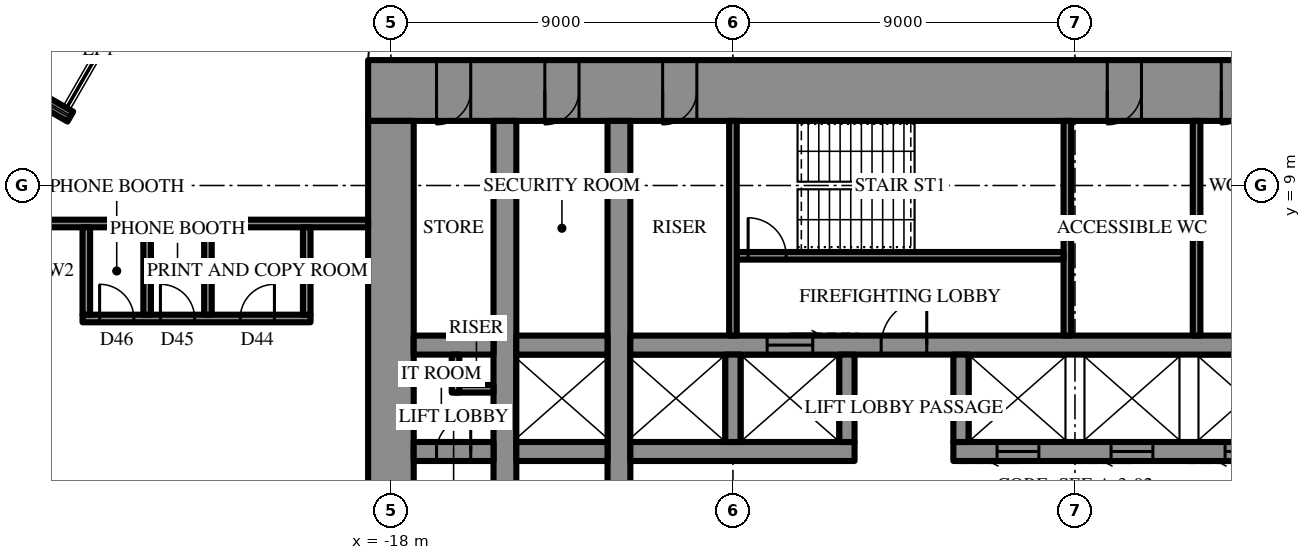
"""IFC4 building model, lengths in metres.
Left out: names, types, materials, properties, quantities, classifications, styles, units other than length and angle.
Written with IfcOpenShell. Run it as: python <this file> out.ifc"""

import sys

from ifc_helpers import new_model, si_unit, direction, frame, frame_2d, origin, place, context, subcontext, project, spatial, rectangle, extrude, element, fill, save


model = new_model("IFC4")
c1 = context("Model", 3, precision=1e-05, world=origin(), true_north=direction((0.0, 1.0)))
c2 = subcontext(c1, "Body", "Model", "MODEL_VIEW")
j1 = project(units=[si_unit("LENGTHUNIT", "METRE"), si_unit("PLANEANGLEUNIT", "RADIAN")], contexts=[c1])
p1 = place(None, origin())
s1 = spatial("IfcSite", under=j1, at=p1, CompositionType="ELEMENT")
p2 = place(p1, origin())
s2 = spatial("IfcBuilding", under=s1, at=p2, CompositionType="ELEMENT")
p3 = place(p2, frame((0.0, 0.0, 123.7)))
s3 = spatial("IfcBuildingStorey", under=s2, at=p3, CompositionType="ELEMENT", Elevation=123.7)
p4 = place(p3, frame((-18.6, 11.5, 0.0), z_axis=(0.0, 0.0, 1.0), x_axis=(1.0, 0.0, 0.0)))
e1 = element("IfcWall", 1, at=p4, inside=s3, PredefinedType="SHEAR", context=c2, shape_type="SweptSolid", body=[
    extrude(rectangle(XDim=37.2, YDim=1.6, at=frame_2d((18.6, 0.0))), origin(), (0.0, 0.0, 1.0), 4.2),
])
p5 = place(p4, frame((19.45, 0.0, 0.0)))
e2 = element("IfcOpeningElement", 2, at=p5, cuts=e1, PredefinedType="OPENING", context=c2, shape_type="SweptSolid", body=[
    extrude(rectangle(XDim=0.9, YDim=2.2, at=frame_2d((0.45, 1.1))), frame((0.0, 0.81, 0.0), z_axis=(0.0, -1.0, 0.0), x_axis=(1.0, 0.0, 0.0)), (0.0, 0.0, 1.0), 1.62),
])
p6 = place(p4, frame((22.45, 0.0, 0.0)))
e3 = element("IfcOpeningElement", 3, at=p6, cuts=e1, PredefinedType="OPENING", context=c2, shape_type="SweptSolid", body=[
    extrude(rectangle(XDim=0.9, YDim=2.2, at=frame_2d((0.45, 1.1))), frame((0.0, 0.81, 0.0), z_axis=(0.0, -1.0, 0.0), x_axis=(1.0, 0.0, 0.0)), (0.0, 0.0, 1.0), 1.62),
])
p7 = place(p4, frame((25.5, 0.0, 0.0)))
e4 = element("IfcOpeningElement", 4, at=p7, cuts=e1, PredefinedType="OPENING", context=c2, shape_type="SweptSolid", body=[
    extrude(rectangle(XDim=1.0, YDim=2.2, at=frame_2d((0.5, 1.1))), frame((0.0, 0.81, 0.0), z_axis=(0.0, -1.0, 0.0), x_axis=(1.0, 0.0, 0.0)), (0.0, 0.0, 1.0), 1.62),
])
p8 = place(p4, frame((1.8, 0.0, 0.0)))
e5 = element("IfcOpeningElement", 5, at=p8, cuts=e1, PredefinedType="OPENING", context=c2, shape_type="SweptSolid", body=[
    extrude(rectangle(XDim=0.9, YDim=2.2, at=frame_2d((0.45, 1.1))), frame((0.0, 0.81, 0.0), z_axis=(0.0, -1.0, 0.0), x_axis=(1.0, 0.0, 0.0)), (0.0, 0.0, 1.0), 1.62),
])
p9 = place(p4, frame((4.65, 0.0, 0.0)))
e6 = element("IfcOpeningElement", 6, at=p9, cuts=e1, PredefinedType="OPENING", context=c2, shape_type="SweptSolid", body=[
    extrude(rectangle(XDim=0.9, YDim=2.2, at=frame_2d((0.45, 1.1))), frame((0.0, 0.81, 0.0), z_axis=(0.0, -1.0, 0.0), x_axis=(1.0, 0.0, 0.0)), (0.0, 0.0, 1.0), 1.62),
])
p10 = place(p4, frame((7.75, 0.0, 0.0)))
e7 = element("IfcOpeningElement", 7, at=p10, cuts=e1, PredefinedType="OPENING", context=c2, shape_type="SweptSolid", body=[
    extrude(rectangle(XDim=0.9, YDim=2.2, at=frame_2d((0.45, 1.1))), frame((0.0, 0.81, 0.0), z_axis=(0.0, -1.0, 0.0), x_axis=(1.0, 0.0, 0.0)), (0.0, 0.0, 1.0), 1.62),
])
p11 = place(p4, frame((28.55, 0.0, 0.0)))
e8 = element("IfcOpeningElement", 8, at=p11, cuts=e1, PredefinedType="OPENING", context=c2, shape_type="SweptSolid", body=[
    extrude(rectangle(XDim=0.9, YDim=2.2, at=frame_2d((0.45, 1.1))), frame((0.0, 0.81, 0.0), z_axis=(0.0, -1.0, 0.0), x_axis=(1.0, 0.0, 0.0)), (0.0, 0.0, 1.0), 1.62),
])
p12 = place(p4, frame((31.65, 0.0, 0.0)))
e9 = element("IfcOpeningElement", 9, at=p12, cuts=e1, PredefinedType="OPENING", context=c2, shape_type="SweptSolid", body=[
    extrude(rectangle(XDim=0.9, YDim=2.2, at=frame_2d((0.45, 1.1))), frame((0.0, 0.81, 0.0), z_axis=(0.0, -1.0, 0.0), x_axis=(1.0, 0.0, 0.0)), (0.0, 0.0, 1.0), 1.62),
])
p13 = place(p4, frame((34.5, 0.0, 0.0)))
e10 = element("IfcOpeningElement", 10, at=p13, cuts=e1, PredefinedType="OPENING", context=c2, shape_type="SweptSolid", body=[
    extrude(rectangle(XDim=0.9, YDim=2.2, at=frame_2d((0.45, 1.1))), frame((0.0, 0.81, 0.0), z_axis=(0.0, -1.0, 0.0), x_axis=(1.0, 0.0, 0.0)), (0.0, 0.0, 1.0), 1.62),
])
p14 = place(p3, frame((-18.0, 10.7, 0.0), z_axis=(0.0, 0.0, 1.0), x_axis=(0.0, -1.0, 0.0)))
e11 = element("IfcWall", 11, at=p14, inside=s3, PredefinedType="SHEAR", context=c2, shape_type="SweptSolid", body=[
    extrude(rectangle(XDim=21.4, YDim=1.2, at=frame_2d((10.7, 0.0))), origin(), (0.0, 0.0, 1.0), 4.2),
])
p15 = place(p14, frame((9.8, 0.0, 0.0)))
e12 = element("IfcOpeningElement", 12, at=p15, cuts=e11, PredefinedType="OPENING", context=c2, shape_type="SweptSolid", body=[
    extrude(rectangle(XDim=1.8, YDim=2.4, at=frame_2d((0.9, 1.2))), frame((0.0, 0.61, 0.0), z_axis=(0.0, -1.0, 0.0), x_axis=(1.0, 0.0, 0.0)), (0.0, 0.0, 1.0), 1.22),
])
p16 = place(p3, frame((-12.0, -10.7, 0.0), z_axis=(0.0, 0.0, 1.0), x_axis=(0.0, 1.0, 0.0)))
e13 = element("IfcWall", 13, at=p16, inside=s3, PredefinedType="SHEAR", context=c2, shape_type="SweptSolid", body=[
    extrude(rectangle(XDim=21.4, YDim=0.6, at=frame_2d((10.7, 0.0))), origin(), (0.0, 0.0, 1.0), 4.2),
])
p17 = place(p16, frame((9.8, 0.0, 0.0)))
e14 = element("IfcOpeningElement", 14, at=p17, cuts=e13, PredefinedType="OPENING", context=c2, shape_type="SweptSolid", body=[
    extrude(rectangle(XDim=1.8, YDim=2.4, at=frame_2d((0.9, 1.2))), frame((0.0, 0.31, 0.0), z_axis=(0.0, -1.0, 0.0), x_axis=(1.0, 0.0, 0.0)), (0.0, 0.0, 1.0), 0.62),
])
p18 = place(p3, frame((-15.0, -10.7, 0.0), z_axis=(0.0, 0.0, 1.0), x_axis=(0.0, 1.0, 0.0)))
e15 = element("IfcWall", 15, at=p18, inside=s3, PredefinedType="SHEAR", context=c2, shape_type="SweptSolid", body=[
    extrude(rectangle(XDim=21.4, YDim=0.6, at=frame_2d((10.7, 0.0))), origin(), (0.0, 0.0, 1.0), 4.2),
])
p19 = place(p18, frame((9.8, 0.0, 0.0)))
e16 = element("IfcOpeningElement", 16, at=p19, cuts=e15, PredefinedType="OPENING", context=c2, shape_type="SweptSolid", body=[
    extrude(rectangle(XDim=1.8, YDim=2.4, at=frame_2d((0.9, 1.2))), frame((0.0, 0.31, 0.0), z_axis=(0.0, -1.0, 0.0), x_axis=(1.0, 0.0, 0.0)), (0.0, 0.0, 1.0), 0.62),
])
p20 = place(p3, frame((-17.4, 2.0, 0.0), z_axis=(0.0, 0.0, 1.0), x_axis=(1.0, 0.0, 0.0)))
e17 = element("IfcWall", 17, at=p20, inside=s3, PredefinedType="SHEAR", context=c2, shape_type="SweptSolid", body=[
    extrude(rectangle(XDim=2.1, YDim=0.5, at=frame_2d((1.05, 0.0))), origin(), (0.0, 0.0, 1.0), 4.2),
])
p21 = place(p20, frame((0.6, 0.0, 0.0)))
e18 = element("IfcOpeningElement", 18, at=p21, cuts=e17, PredefinedType="OPENING", context=c2, shape_type="SweptSolid", body=[
    extrude(rectangle(XDim=0.9, YDim=2.2, at=frame_2d((0.45, 1.1))), frame((0.0, 0.26, 0.0), z_axis=(0.0, -1.0, 0.0), x_axis=(1.0, 0.0, 0.0)), (0.0, 0.0, 1.0), 0.52),
])
p22 = place(p3, frame((-14.7, 2.0, 0.0), z_axis=(0.0, 0.0, 1.0), x_axis=(1.0, 0.0, 0.0)))
e19 = element("IfcWall", 19, at=p22, inside=s3, PredefinedType="SHEAR", context=c2, shape_type="SweptSolid", body=[
    extrude(rectangle(XDim=2.4, YDim=0.5, at=frame_2d((1.2, 0.0))), origin(), (0.0, 0.0, 1.0), 4.2),
])
p23 = place(p3, frame((-11.7, 2.0, 0.0), z_axis=(0.0, 0.0, 1.0), x_axis=(1.0, 0.0, 0.0)))
e20 = element("IfcWall", 20, at=p23, inside=s3, PredefinedType="SHEAR", context=c2, shape_type="SweptSolid", body=[
    extrude(rectangle(XDim=5.9, YDim=0.5, at=frame_2d((2.95, 0.0))), origin(), (0.0, 0.0, 1.0), 4.2),
])
p24 = place(p3, frame((-3.2, 2.0, 0.0), z_axis=(0.0, 0.0, 1.0), x_axis=(1.0, 0.0, 0.0)))
e21 = element("IfcWall", 21, at=p24, inside=s3, PredefinedType="SHEAR", context=c2, shape_type="SweptSolid", body=[
    extrude(rectangle(XDim=14.9, YDim=0.5, at=frame_2d((7.45, 0.0))), origin(), (0.0, 0.0, 1.0), 4.2),
])
p25 = place(p24, frame((1.15, 0.0, 0.0)))
e22 = element("IfcOpeningElement", 22, at=p25, cuts=e21, PredefinedType="OPENING", context=c2, shape_type="SweptSolid", body=[
    extrude(rectangle(XDim=1.1, YDim=2.2, at=frame_2d((0.55, 1.1))), frame((0.0, 0.26, 0.0), z_axis=(0.0, -1.0, 0.0), x_axis=(1.0, 0.0, 0.0)), (0.0, 0.0, 1.0), 0.52),
])
p26 = place(p24, frame((4.15, 0.0, 0.0)))
e23 = element("IfcOpeningElement", 23, at=p26, cuts=e21, PredefinedType="OPENING", context=c2, shape_type="SweptSolid", body=[
    extrude(rectangle(XDim=1.1, YDim=2.2, at=frame_2d((0.55, 1.1))), frame((0.0, 0.26, 0.0), z_axis=(0.0, -1.0, 0.0), x_axis=(1.0, 0.0, 0.0)), (0.0, 0.0, 1.0), 0.52),
])
p27 = place(p24, frame((7.15, 0.0, 0.0)))
e24 = element("IfcOpeningElement", 24, at=p27, cuts=e21, PredefinedType="OPENING", context=c2, shape_type="SweptSolid", body=[
    extrude(rectangle(XDim=1.1, YDim=2.2, at=frame_2d((0.55, 1.1))), frame((0.0, 0.26, 0.0), z_axis=(0.0, -1.0, 0.0), x_axis=(1.0, 0.0, 0.0)), (0.0, 0.0, 1.0), 0.52),
])
p28 = place(p24, frame((10.15, 0.0, 0.0)))
e25 = element("IfcOpeningElement", 25, at=p28, cuts=e21, PredefinedType="OPENING", context=c2, shape_type="SweptSolid", body=[
    extrude(rectangle(XDim=1.1, YDim=2.2, at=frame_2d((0.55, 1.1))), frame((0.0, 0.26, 0.0), z_axis=(0.0, -1.0, 0.0), x_axis=(1.0, 0.0, 0.0)), (0.0, 0.0, 1.0), 0.52),
])
p29 = place(p3, frame((-17.4, 4.8, 0.0), z_axis=(0.0, 0.0, 1.0), x_axis=(1.0, 0.0, 0.0)))
e26 = element("IfcWall", 26, at=p29, inside=s3, PredefinedType="SHEAR", context=c2, shape_type="SweptSolid", body=[
    extrude(rectangle(XDim=2.1, YDim=0.5, at=frame_2d((1.05, 0.0))), origin(), (0.0, 0.0, 1.0), 4.2),
])
p30 = place(p3, frame((-14.7, 4.8, 0.0), z_axis=(0.0, 0.0, 1.0), x_axis=(1.0, 0.0, 0.0)))
e27 = element("IfcWall", 27, at=p30, inside=s3, PredefinedType="SHEAR", context=c2, shape_type="SweptSolid", body=[
    extrude(rectangle(XDim=2.4, YDim=0.5, at=frame_2d((1.2, 0.0))), origin(), (0.0, 0.0, 1.0), 4.2),
])
p31 = place(p3, frame((-11.7, 4.8, 0.0), z_axis=(0.0, 0.0, 1.0), x_axis=(1.0, 0.0, 0.0)))
e28 = element("IfcWall", 28, at=p31, inside=s3, PredefinedType="SHEAR", context=c2, shape_type="SweptSolid", body=[
    extrude(rectangle(XDim=23.4, YDim=0.5, at=frame_2d((11.7, 0.0))), origin(), (0.0, 0.0, 1.0), 4.2),
])
p32 = place(p31, frame((6.6, 0.0, 0.0)))
e29 = element("IfcOpeningElement", 29, at=p32, cuts=e28, PredefinedType="OPENING", context=c2, shape_type="SweptSolid", body=[
    extrude(rectangle(XDim=1.2, YDim=2.2, at=frame_2d((0.6, 1.1))), frame((0.0, 0.26, 0.0), z_axis=(0.0, -1.0, 0.0), x_axis=(1.0, 0.0, 0.0)), (0.0, 0.0, 1.0), 0.52),
])
p33 = place(p31, frame((3.6, 0.0, 0.0)))
e30 = element("IfcOpeningElement", 30, at=p33, cuts=e28, PredefinedType="OPENING", context=c2, shape_type="SweptSolid", body=[
    extrude(rectangle(XDim=1.2, YDim=2.2, at=frame_2d((0.6, 1.1))), frame((0.0, 0.26, 0.0), z_axis=(0.0, -1.0, 0.0), x_axis=(1.0, 0.0, 0.0)), (0.0, 0.0, 1.0), 0.52),
])
for number, where, z_axis, x_axis in (
    (31, (-9.0, 2.25, 0.0), (0.0, 0.0, 1.0), (0.0, 1.0, 0.0)),
    (32, (-6.0, 2.25, 0.0), (0.0, 0.0, 1.0), (0.0, 1.0, 0.0)),
    (33, (-3.0, 2.25, 0.0), (0.0, 0.0, 1.0), (0.0, 1.0, 0.0)),
):
    element("IfcWall", number, at=place(p3, frame(where, z_axis=z_axis, x_axis=x_axis)), inside=s3, PredefinedType="SHEAR", context=c2, shape_type="SweptSolid", body=[
        extrude(rectangle(XDim=2.3, YDim=0.4, at=frame_2d((1.15, 0.0))), origin(), (0.0, 0.0, 1.0), 4.2),
    ])
p34 = place(p3, frame((-0.2, 5.05, 0.0), z_axis=(0.0, 0.0, 1.0), x_axis=(0.0, 1.0, 0.0)))
e34 = element("IfcWall", 34, at=p34, inside=s3, PredefinedType="SHEAR", context=c2, shape_type="SweptSolid", body=[
    extrude(rectangle(XDim=5.65, YDim=0.2, at=frame_2d((2.825, 0.0))), origin(), (0.0, 0.0, 1.0), 4.2),
])
p35 = place(p3, frame((-8.9, 7.15, 0.0), z_axis=(0.0, 0.0, 1.0), x_axis=(1.0, 0.0, 0.0)))
e35 = element("IfcWall", 35, at=p35, inside=s3, PredefinedType="SHEAR", context=c2, shape_type="SweptSolid", body=[
    extrude(rectangle(XDim=8.6, YDim=0.2, at=frame_2d((4.3, 0.0))), origin(), (0.0, 0.0, 1.0), 4.2),
])
p36 = place(p35, frame((0.3, 0.0, 0.0)))
e36 = element("IfcOpeningElement", 36, at=p36, cuts=e35, PredefinedType="OPENING", context=c2, shape_type="SweptSolid", body=[
    extrude(rectangle(XDim=1.0, YDim=2.2, at=frame_2d((0.5, 1.1))), frame((0.0, 0.11, 0.0), z_axis=(0.0, -1.0, 0.0), x_axis=(1.0, 0.0, 0.0)), (0.0, 0.0, 1.0), 0.22),
])
p37 = place(p3, frame((-29.12, 12.363, 0.0), z_axis=(0.0, 0.0, 1.0), x_axis=(0.86602952684, -0.49999285859, 0.0)))
e37 = element("IfcWall", 37, at=p37, inside=s3, PredefinedType="SOLIDWALL", context=c2, shape_type="SweptSolid", body=[
    extrude(rectangle(XDim=3.1, YDim=0.3, at=frame_2d((1.55, 0.0))), origin(), (0.0, 0.0, 1.0), 2.3),
])
for number, where, z_axis, x_axis in (
    (38, (-9.0, 5.05, 0.0), (0.0, 0.0, 1.0), (0.0, 1.0, 0.0)),
    (39, (3.2, 5.05, 0.0), (0.0, 0.0, 1.0), (0.0, 1.0, 0.0)),
):
    element("IfcWall", number, at=place(p3, frame(where, z_axis=z_axis, x_axis=x_axis)), inside=s3, PredefinedType="PARTITIONING", context=c2, shape_type="SweptSolid", body=[
        extrude(rectangle(XDim=5.65, YDim=0.2, at=frame_2d((2.825, 0.0))), origin(), (0.0, 0.0, 1.0), 4.0),
    ])
for number, where, z_axis, x_axis in (
    (40, (-16.3, 3.65, 0.0), (0.0, 0.0, 1.0), (1.0, 0.0, 0.0)),
    (41, (-16.3, 3.55, 0.0), (0.0, 0.0, 1.0), (0.0, 1.0, 0.0)),
):
    element("IfcWall", number, at=place(p3, frame(where, z_axis=z_axis, x_axis=x_axis)), inside=s3, PredefinedType="PARTITIONING", context=c2, shape_type="SweptSolid", body=[
        extrude(rectangle(XDim=1.0, YDim=0.2, at=frame_2d((0.5, 0.0))), origin(), (0.0, 0.0, 1.0), 4.0),
    ])
p38 = place(p3, frame((-18.6, 8.0, 0.0), z_axis=(0.0, 0.0, 1.0), x_axis=(-1.0, 0.0, 0.0)))
e42 = element("IfcWall", 42, at=p38, inside=s3, PredefinedType="PARTITIONING", context=c2, shape_type="SweptSolid", body=[
    extrude(rectangle(XDim=12.9, YDim=0.2, at=frame_2d((6.45, 0.0))), origin(), (0.0, 0.0, 1.0), 4.0),
])
p39 = place(p3, frame((-20.115, 5.5, 0.0), z_axis=(0.0, 0.0, 1.0), x_axis=(-1.0, 0.0, 0.0)))
e43 = element("IfcWall", 43, at=p39, inside=s3, PredefinedType="PARTITIONING", context=c2, shape_type="SweptSolid", body=[
    extrude(rectangle(XDim=6.0, YDim=0.2, at=frame_2d((3.0, 0.0))), origin(), (0.0, 0.0, 1.0), 4.0),
])
p40 = place(p39, frame((0.95, 0.0, 0.0)))
e44 = element("IfcOpeningElement", 44, at=p40, cuts=e43, PredefinedType="OPENING", context=c2, shape_type="SweptSolid", body=[
    extrude(rectangle(XDim=0.9, YDim=2.2, at=frame_2d((0.45, 1.1))), frame((0.0, 0.11, 0.0), z_axis=(0.0, -1.0, 0.0), x_axis=(1.0, 0.0, 0.0)), (0.0, 0.0, 1.0), 0.22),
])
p41 = place(p39, frame((3.05, 0.0, 0.0)))
e45 = element("IfcOpeningElement", 45, at=p41, cuts=e43, PredefinedType="OPENING", context=c2, shape_type="SweptSolid", body=[
    extrude(rectangle(XDim=0.9, YDim=2.2, at=frame_2d((0.45, 1.1))), frame((0.0, 0.11, 0.0), z_axis=(0.0, -1.0, 0.0), x_axis=(1.0, 0.0, 0.0)), (0.0, 0.0, 1.0), 0.22),
])
p42 = place(p39, frame((4.65, 0.0, 0.0)))
e46 = element("IfcOpeningElement", 46, at=p42, cuts=e43, PredefinedType="OPENING", context=c2, shape_type="SweptSolid", body=[
    extrude(rectangle(XDim=0.9, YDim=2.2, at=frame_2d((0.45, 1.1))), frame((0.0, 0.11, 0.0), z_axis=(0.0, -1.0, 0.0), x_axis=(1.0, 0.0, 0.0)), (0.0, 0.0, 1.0), 0.22),
])
for number, where, z_axis, x_axis in (
    (47, (-20.215, 7.9, 0.0), (0.0, 0.0, 1.0), (0.0, -1.0, 0.0)),
    (48, (-22.815, 7.9, 0.0), (0.0, 0.0, 1.0), (0.0, -1.0, 0.0)),
    (49, (-24.415, 7.9, 0.0), (0.0, 0.0, 1.0), (0.0, -1.0, 0.0)),
    (50, (-26.015, 7.9, 0.0), (0.0, 0.0, 1.0), (0.0, -1.0, 0.0)),
):
    element("IfcWall", number, at=place(p3, frame(where, z_axis=z_axis, x_axis=x_axis)), inside=s3, PredefinedType="PARTITIONING", context=c2, shape_type="SweptSolid", body=[
        extrude(rectangle(XDim=2.3, YDim=0.2, at=frame_2d((1.15, 0.0))), origin(), (0.0, 0.0, 1.0), 4.0),
    ])
p43 = place(p32, origin())
e51 = element("IfcDoor", 51, at=p43, inside=s3, OperationType="SINGLE_SWING_LEFT", PredefinedType="DOOR", context=c2, shape_type="SweptSolid", body=[
    extrude(rectangle(XDim=1.2, YDim=2.2, at=frame_2d((0.6, 1.1))), frame((0.0, 0.025, 0.0), z_axis=(0.0, -1.0, 0.0), x_axis=(1.0, 0.0, 0.0)), (0.0, 0.0, 1.0), 0.05),
])
fill(e29, e51)
p44 = place(p36, origin())
e52 = element("IfcDoor", 52, at=p44, inside=s3, OperationType="SINGLE_SWING_RIGHT", PredefinedType="DOOR", context=c2, shape_type="SweptSolid", body=[
    extrude(rectangle(XDim=1.0, YDim=2.2, at=frame_2d((0.5, 1.1))), frame((0.0, 0.025, 0.0), z_axis=(0.0, -1.0, 0.0), x_axis=(1.0, 0.0, 0.0)), (0.0, 0.0, 1.0), 0.05),
])
fill(e36, e52)
p45 = place(p5, frame((0.9, 0.0, 0.0), z_axis=(0.0, 0.0, 1.0), x_axis=(-1.0, 0.0, 0.0)))
e53 = element("IfcDoor", 53, at=p45, inside=s3, OperationType="SINGLE_SWING_LEFT", PredefinedType="DOOR", context=c2, shape_type="SweptSolid", body=[
    extrude(rectangle(XDim=0.9, YDim=2.2, at=frame_2d((0.45, 1.1))), frame((0.0, 0.025, 0.0), z_axis=(0.0, -1.0, 0.0), x_axis=(1.0, 0.0, 0.0)), (0.0, 0.0, 1.0), 0.05),
])
fill(e2, e53)
p46 = place(p6, frame((0.9, 0.0, 0.0), z_axis=(0.0, 0.0, 1.0), x_axis=(-1.0, 0.0, 0.0)))
e54 = element("IfcDoor", 54, at=p46, inside=s3, OperationType="SINGLE_SWING_LEFT", PredefinedType="DOOR", context=c2, shape_type="SweptSolid", body=[
    extrude(rectangle(XDim=0.9, YDim=2.2, at=frame_2d((0.45, 1.1))), frame((0.0, 0.025, 0.0), z_axis=(0.0, -1.0, 0.0), x_axis=(1.0, 0.0, 0.0)), (0.0, 0.0, 1.0), 0.05),
])
fill(e3, e54)
p47 = place(p8, frame((0.9, 0.0, 0.0), z_axis=(0.0, 0.0, 1.0), x_axis=(-1.0, 0.0, 0.0)))
e55 = element("IfcDoor", 55, at=p47, inside=s3, OperationType="SINGLE_SWING_LEFT", PredefinedType="DOOR", context=c2, shape_type="SweptSolid", body=[
    extrude(rectangle(XDim=0.9, YDim=2.2, at=frame_2d((0.45, 1.1))), frame((0.0, 0.025, 0.0), z_axis=(0.0, -1.0, 0.0), x_axis=(1.0, 0.0, 0.0)), (0.0, 0.0, 1.0), 0.05),
])
fill(e5, e55)
p48 = place(p9, frame((0.9, 0.0, 0.0), z_axis=(0.0, 0.0, 1.0), x_axis=(-1.0, 0.0, 0.0)))
e56 = element("IfcDoor", 56, at=p48, inside=s3, OperationType="SINGLE_SWING_LEFT", PredefinedType="DOOR", context=c2, shape_type="SweptSolid", body=[
    extrude(rectangle(XDim=0.9, YDim=2.2, at=frame_2d((0.45, 1.1))), frame((0.0, 0.025, 0.0), z_axis=(0.0, -1.0, 0.0), x_axis=(1.0, 0.0, 0.0)), (0.0, 0.0, 1.0), 0.05),
])
fill(e6, e56)
p49 = place(p10, frame((0.9, 0.0, 0.0), z_axis=(0.0, 0.0, 1.0), x_axis=(-1.0, 0.0, 0.0)))
e57 = element("IfcDoor", 57, at=p49, inside=s3, OperationType="SINGLE_SWING_LEFT", PredefinedType="DOOR", context=c2, shape_type="SweptSolid", body=[
    extrude(rectangle(XDim=0.9, YDim=2.2, at=frame_2d((0.45, 1.1))), frame((0.0, 0.025, 0.0), z_axis=(0.0, -1.0, 0.0), x_axis=(1.0, 0.0, 0.0)), (0.0, 0.0, 1.0), 0.05),
])
fill(e7, e57)
p50 = place(p21, origin())
e58 = element("IfcDoor", 58, at=p50, inside=s3, OperationType="SINGLE_SWING_LEFT", PredefinedType="DOOR", context=c2, shape_type="SweptSolid", body=[
    extrude(rectangle(XDim=0.9, YDim=2.2, at=frame_2d((0.45, 1.1))), frame((0.0, 0.025, 0.0), z_axis=(0.0, -1.0, 0.0), x_axis=(1.0, 0.0, 0.0)), (0.0, 0.0, 1.0), 0.05),
])
fill(e18, e58)
p51 = place(p33, origin())
e59 = element("IfcDoor", 59, at=p51, inside=s3, OperationType="SLIDING_TO_LEFT", PredefinedType="DOOR", context=c2, shape_type="SweptSolid", body=[
    extrude(rectangle(XDim=1.2, YDim=2.2, at=frame_2d((0.6, 1.1))), frame((0.0, 0.025, 0.0), z_axis=(0.0, -1.0, 0.0), x_axis=(1.0, 0.0, 0.0)), (0.0, 0.0, 1.0), 0.05),
])
fill(e30, e59)
p52 = place(p25, frame((1.1, 0.0, 0.0), z_axis=(0.0, 0.0, 1.0), x_axis=(-1.0, 0.0, 0.0)))
e60 = element("IfcDoor", 60, at=p52, inside=s3, OperationType="SLIDING_TO_LEFT", PredefinedType="DOOR", context=c2, shape_type="SweptSolid", body=[
    extrude(rectangle(XDim=1.1, YDim=2.2, at=frame_2d((0.55, 1.1))), frame((0.0, 0.025, 0.0), z_axis=(0.0, -1.0, 0.0), x_axis=(1.0, 0.0, 0.0)), (0.0, 0.0, 1.0), 0.05),
])
fill(e22, e60)
p53 = place(p26, frame((1.1, 0.0, 0.0), z_axis=(0.0, 0.0, 1.0), x_axis=(-1.0, 0.0, 0.0)))
e61 = element("IfcDoor", 61, at=p53, inside=s3, OperationType="SLIDING_TO_LEFT", PredefinedType="DOOR", context=c2, shape_type="SweptSolid", body=[
    extrude(rectangle(XDim=1.1, YDim=2.2, at=frame_2d((0.55, 1.1))), frame((0.0, 0.025, 0.0), z_axis=(0.0, -1.0, 0.0), x_axis=(1.0, 0.0, 0.0)), (0.0, 0.0, 1.0), 0.05),
])
fill(e23, e61)
p54 = place(p27, frame((1.1, 0.0, 0.0), z_axis=(0.0, 0.0, 1.0), x_axis=(-1.0, 0.0, 0.0)))
e62 = element("IfcDoor", 62, at=p54, inside=s3, OperationType="SLIDING_TO_LEFT", PredefinedType="DOOR", context=c2, shape_type="SweptSolid", body=[
    extrude(rectangle(XDim=1.1, YDim=2.2, at=frame_2d((0.55, 1.1))), frame((0.0, 0.025, 0.0), z_axis=(0.0, -1.0, 0.0), x_axis=(1.0, 0.0, 0.0)), (0.0, 0.0, 1.0), 0.05),
])
fill(e24, e62)
p55 = place(p40, frame((0.9, 0.0, 0.0), z_axis=(0.0, 0.0, 1.0), x_axis=(-1.0, 0.0, 0.0)))
e63 = element("IfcDoor", 63, at=p55, inside=s3, OperationType="SINGLE_SWING_LEFT", PredefinedType="DOOR", context=c2, shape_type="SweptSolid", body=[
    extrude(rectangle(XDim=0.9, YDim=2.2, at=frame_2d((0.45, 1.1))), frame((0.0, 0.025, 0.0), z_axis=(0.0, -1.0, 0.0), x_axis=(1.0, 0.0, 0.0)), (0.0, 0.0, 1.0), 0.05),
])
fill(e44, e63)
p56 = place(p41, frame((0.9, 0.0, 0.0), z_axis=(0.0, 0.0, 1.0), x_axis=(-1.0, 0.0, 0.0)))
e64 = element("IfcDoor", 64, at=p56, inside=s3, OperationType="SINGLE_SWING_RIGHT", PredefinedType="DOOR", context=c2, shape_type="SweptSolid", body=[
    extrude(rectangle(XDim=0.9, YDim=2.2, at=frame_2d((0.45, 1.1))), frame((0.0, 0.025, 0.0), z_axis=(0.0, -1.0, 0.0), x_axis=(1.0, 0.0, 0.0)), (0.0, 0.0, 1.0), 0.05),
])
fill(e45, e64)
p57 = place(p42, frame((0.9, 0.0, 0.0), z_axis=(0.0, 0.0, 1.0), x_axis=(-1.0, 0.0, 0.0)))
e65 = element("IfcDoor", 65, at=p57, inside=s3, OperationType="SINGLE_SWING_RIGHT", PredefinedType="DOOR", context=c2, shape_type="SweptSolid", body=[
    extrude(rectangle(XDim=0.9, YDim=2.2, at=frame_2d((0.45, 1.1))), frame((0.0, 0.025, 0.0), z_axis=(0.0, -1.0, 0.0), x_axis=(1.0, 0.0, 0.0)), (0.0, 0.0, 1.0), 0.05),
])
fill(e46, e65)
save(model, sys.argv[1])
